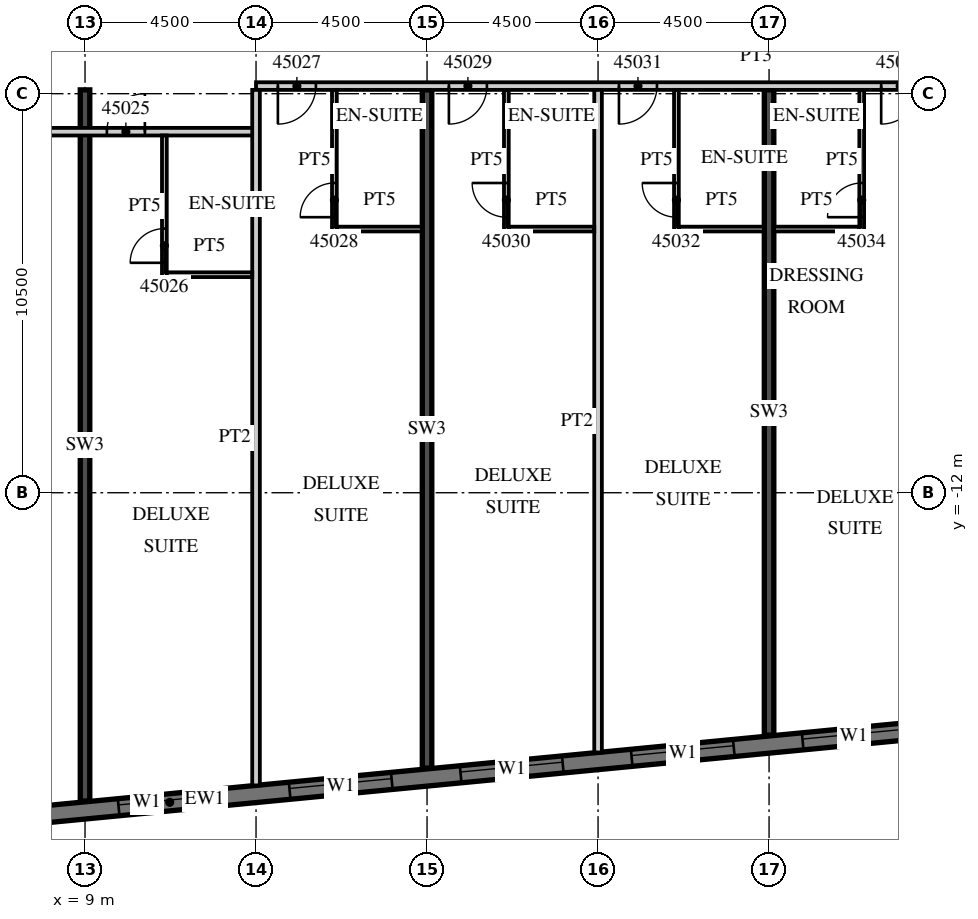
"""IFC4 building model, lengths in metres.
Left out: names, types, materials, properties, quantities, classifications, styles, units other than length and angle.
Written with IfcOpenShell. Run it as: python <this file> out.ifc"""

import sys

from ifc_helpers import new_model, si_unit, direction, frame, frame_2d, origin, place, context, subcontext, project, spatial, rectangle, extrude, element, fill, save


model = new_model("IFC4")
c1 = context("Model", 3, precision=1e-05, world=origin(), true_north=direction((0.0, 1.0)))
c2 = subcontext(c1, "Body", "Model", "MODEL_VIEW")
j1 = project(units=[si_unit("LENGTHUNIT", "METRE"), si_unit("PLANEANGLEUNIT", "RADIAN")], contexts=[c1])
p1 = place(None, origin())
s1 = spatial("IfcSite", under=j1, at=p1, CompositionType="ELEMENT")
p2 = place(p1, origin())
s2 = spatial("IfcBuilding", under=s1, at=p2, CompositionType="ELEMENT")
p3 = place(p2, frame((0.0, 0.0, 190.0)))
s3 = spatial("IfcBuildingStorey", under=s2, at=p3, CompositionType="ELEMENT", Elevation=190.0)
p4 = place(p3, frame((9.0, -20.112, 0.0), z_axis=(0.0, 0.0, 1.0), x_axis=(0.0, 1.0, 0.0)))
e1 = element("IfcWall", 1, at=p4, inside=s3, PredefinedType="SHEAR", context=c2, shape_type="SweptSolid", body=[
    extrude(rectangle(XDim=18.712, YDim=0.25, at=frame_2d((9.356, 0.0))), origin(), (0.0, 0.0, 1.0), 3.3),
])
p5 = place(p3, frame((18.0, -19.245, 0.0), z_axis=(0.0, 0.0, 1.0), x_axis=(0.0, 1.0, 0.0)))
e2 = element("IfcWall", 2, at=p5, inside=s3, PredefinedType="SHEAR", context=c2, shape_type="SweptSolid", body=[
    extrude(rectangle(XDim=17.845, YDim=0.25, at=frame_2d((8.923, 0.0))), origin(), (0.0, 0.0, 1.0), 3.3),
])
p6 = place(p3, frame((27.0, -18.379, 0.0), z_axis=(0.0, 0.0, 1.0), x_axis=(0.0, 1.0, 0.0)))
e3 = element("IfcWall", 3, at=p6, inside=s3, PredefinedType="SHEAR", context=c2, shape_type="SweptSolid", body=[
    extrude(rectangle(XDim=16.979, YDim=0.25, at=frame_2d((8.489, 0.0))), origin(), (0.0, 0.0, 1.0), 3.3),
])
p7 = place(p3, frame((-13.521, -22.529, 0.0), z_axis=(0.0, 0.0, 1.0), x_axis=(0.995396436651, 0.095843277819, 0.0)))
e4 = element("IfcWall", 4, at=p7, inside=s3, PredefinedType="SOLIDWALL", context=c2, shape_type="SweptSolid", body=[
    extrude(rectangle(XDim=51.578, YDim=0.45, at=frame_2d((25.789, 0.0))), origin(), (0.0, 0.0, 1.0), 3.02),
])
p8 = place(p7, frame((0.91, 0.0, 0.45)))
e5 = element("IfcOpeningElement", 5, at=p8, cuts=e4, PredefinedType="OPENING", context=c2, shape_type="SweptSolid", body=[
    extrude(rectangle(XDim=2.7, YDim=2.25, at=frame_2d((1.35, 1.125))), frame((0.0, 0.235, 0.0), z_axis=(0.0, -1.0, 0.0), x_axis=(1.0, 0.0, 0.0)), (0.0, 0.0, 1.0), 0.47),
])
p9 = place(p7, frame((5.431, 0.0, 0.45)))
e6 = element("IfcOpeningElement", 6, at=p9, cuts=e4, PredefinedType="OPENING", context=c2, shape_type="SweptSolid", body=[
    extrude(rectangle(XDim=2.7, YDim=2.25, at=frame_2d((1.35, 1.125))), frame((0.0, 0.235, 0.0), z_axis=(0.0, -1.0, 0.0), x_axis=(1.0, 0.0, 0.0)), (0.0, 0.0, 1.0), 0.47),
])
p10 = place(p7, frame((9.952, 0.0, 0.45)))
e7 = element("IfcOpeningElement", 7, at=p10, cuts=e4, PredefinedType="OPENING", context=c2, shape_type="SweptSolid", body=[
    extrude(rectangle(XDim=2.7, YDim=2.25, at=frame_2d((1.35, 1.125))), frame((0.0, 0.235, 0.0), z_axis=(0.0, -1.0, 0.0), x_axis=(1.0, 0.0, 0.0)), (0.0, 0.0, 1.0), 0.47),
])
p11 = place(p7, frame((14.473, 0.0, 0.45)))
e8 = element("IfcOpeningElement", 8, at=p11, cuts=e4, PredefinedType="OPENING", context=c2, shape_type="SweptSolid", body=[
    extrude(rectangle(XDim=2.7, YDim=2.25, at=frame_2d((1.35, 1.125))), frame((0.0, 0.235, 0.0), z_axis=(0.0, -1.0, 0.0), x_axis=(1.0, 0.0, 0.0)), (0.0, 0.0, 1.0), 0.47),
])
p12 = place(p7, frame((18.994, 0.0, 0.45)))
e9 = element("IfcOpeningElement", 9, at=p12, cuts=e4, PredefinedType="OPENING", context=c2, shape_type="SweptSolid", body=[
    extrude(rectangle(XDim=2.7, YDim=2.25, at=frame_2d((1.35, 1.125))), frame((0.0, 0.235, 0.0), z_axis=(0.0, -1.0, 0.0), x_axis=(1.0, 0.0, 0.0)), (0.0, 0.0, 1.0), 0.47),
])
p13 = place(p7, frame((23.514, 0.0, 0.45)))
e10 = element("IfcOpeningElement", 10, at=p13, cuts=e4, PredefinedType="OPENING", context=c2, shape_type="SweptSolid", body=[
    extrude(rectangle(XDim=2.7, YDim=2.25, at=frame_2d((1.35, 1.125))), frame((0.0, 0.235, 0.0), z_axis=(0.0, -1.0, 0.0), x_axis=(1.0, 0.0, 0.0)), (0.0, 0.0, 1.0), 0.47),
])
p14 = place(p7, frame((28.035, 0.0, 0.45)))
e11 = element("IfcOpeningElement", 11, at=p14, cuts=e4, PredefinedType="OPENING", context=c2, shape_type="SweptSolid", body=[
    extrude(rectangle(XDim=2.7, YDim=2.25, at=frame_2d((1.35, 1.125))), frame((0.0, 0.235, 0.0), z_axis=(0.0, -1.0, 0.0), x_axis=(1.0, 0.0, 0.0)), (0.0, 0.0, 1.0), 0.47),
])
p15 = place(p7, frame((32.556, 0.0, 0.45)))
e12 = element("IfcOpeningElement", 12, at=p15, cuts=e4, PredefinedType="OPENING", context=c2, shape_type="SweptSolid", body=[
    extrude(rectangle(XDim=2.7, YDim=2.25, at=frame_2d((1.35, 1.125))), frame((0.0, 0.235, 0.0), z_axis=(0.0, -1.0, 0.0), x_axis=(1.0, 0.0, 0.0)), (0.0, 0.0, 1.0), 0.47),
])
p16 = place(p7, frame((37.077, 0.0, 0.45)))
e13 = element("IfcOpeningElement", 13, at=p16, cuts=e4, PredefinedType="OPENING", context=c2, shape_type="SweptSolid", body=[
    extrude(rectangle(XDim=2.7, YDim=2.25, at=frame_2d((1.35, 1.125))), frame((0.0, 0.235, 0.0), z_axis=(0.0, -1.0, 0.0), x_axis=(1.0, 0.0, 0.0)), (0.0, 0.0, 1.0), 0.47),
])
p17 = place(p7, frame((41.598, 0.0, 0.45)))
e14 = element("IfcOpeningElement", 14, at=p17, cuts=e4, PredefinedType="OPENING", context=c2, shape_type="SweptSolid", body=[
    extrude(rectangle(XDim=2.7, YDim=2.25, at=frame_2d((1.35, 1.125))), frame((0.0, 0.235, 0.0), z_axis=(0.0, -1.0, 0.0), x_axis=(1.0, 0.0, 0.0)), (0.0, 0.0, 1.0), 0.47),
])
p18 = place(p7, frame((46.119, 0.0, 0.45)))
e15 = element("IfcOpeningElement", 15, at=p18, cuts=e4, PredefinedType="OPENING", context=c2, shape_type="SweptSolid", body=[
    extrude(rectangle(XDim=2.7, YDim=2.25, at=frame_2d((1.35, 1.125))), frame((0.0, 0.235, 0.0), z_axis=(0.0, -1.0, 0.0), x_axis=(1.0, 0.0, 0.0)), (0.0, 0.0, 1.0), 0.47),
])
p19 = place(p3, frame((-13.5, -2.5, 0.0), z_axis=(0.0, 0.0, 1.0), x_axis=(1.0, 0.0, 0.0)))
e16 = element("IfcWall", 16, at=p19, inside=s3, PredefinedType="PARTITIONING", context=c2, shape_type="SweptSolid", body=[
    extrude(rectangle(XDim=27.0, YDim=0.2, at=frame_2d((13.5, 0.0))), origin(), (0.0, 0.0, 1.0), 3.02),
])
p20 = place(p19, frame((0.575, 0.0, 0.0)))
e17 = element("IfcOpeningElement", 17, at=p20, cuts=e16, PredefinedType="OPENING", context=c2, shape_type="SweptSolid", body=[
    extrude(rectangle(XDim=1.0, YDim=2.1, at=frame_2d((0.5, 1.05))), frame((0.0, 0.11, 0.0), z_axis=(0.0, -1.0, 0.0), x_axis=(1.0, 0.0, 0.0)), (0.0, 0.0, 1.0), 0.22),
])
p21 = place(p19, frame((7.45, 0.0, 0.0)))
e18 = element("IfcOpeningElement", 18, at=p21, cuts=e16, PredefinedType="OPENING", context=c2, shape_type="SweptSolid", body=[
    extrude(rectangle(XDim=1.0, YDim=2.1, at=frame_2d((0.5, 1.05))), frame((0.0, 0.11, 0.0), z_axis=(0.0, -1.0, 0.0), x_axis=(1.0, 0.0, 0.0)), (0.0, 0.0, 1.0), 0.22),
])
p22 = place(p19, frame((9.55, 0.0, 0.0)))
e19 = element("IfcOpeningElement", 19, at=p22, cuts=e16, PredefinedType="OPENING", context=c2, shape_type="SweptSolid", body=[
    extrude(rectangle(XDim=1.0, YDim=2.1, at=frame_2d((0.5, 1.05))), frame((0.0, 0.11, 0.0), z_axis=(0.0, -1.0, 0.0), x_axis=(1.0, 0.0, 0.0)), (0.0, 0.0, 1.0), 0.22),
])
p23 = place(p19, frame((18.862, 0.0, 0.0)))
e20 = element("IfcOpeningElement", 20, at=p23, cuts=e16, PredefinedType="OPENING", context=c2, shape_type="SweptSolid", body=[
    extrude(rectangle(XDim=1.2, YDim=2.1, at=frame_2d((0.6, 1.05))), frame((0.0, 0.11, 0.0), z_axis=(0.0, -1.0, 0.0), x_axis=(1.0, 0.0, 0.0)), (0.0, 0.0, 1.0), 0.22),
])
p24 = place(p19, frame((23.075, 0.0, 0.0)))
e21 = element("IfcOpeningElement", 21, at=p24, cuts=e16, PredefinedType="OPENING", context=c2, shape_type="SweptSolid", body=[
    extrude(rectangle(XDim=1.0, YDim=2.1, at=frame_2d((0.5, 1.05))), frame((0.0, 0.11, 0.0), z_axis=(0.0, -1.0, 0.0), x_axis=(1.0, 0.0, 0.0)), (0.0, 0.0, 1.0), 0.22),
])
p25 = place(p3, frame((13.5, -1.3, 0.0), z_axis=(0.0, 0.0, 1.0), x_axis=(1.0, 0.0, 0.0)))
e22 = element("IfcWall", 22, at=p25, inside=s3, PredefinedType="PARTITIONING", context=c2, shape_type="SweptSolid", body=[
    extrude(rectangle(XDim=26.317, YDim=0.2, at=frame_2d((13.158, 0.0))), origin(), (0.0, 0.0, 1.0), 3.02),
])
p26 = place(p25, frame((0.575, 0.0, 0.0)))
e23 = element("IfcOpeningElement", 23, at=p26, cuts=e22, PredefinedType="OPENING", context=c2, shape_type="SweptSolid", body=[
    extrude(rectangle(XDim=1.0, YDim=2.1, at=frame_2d((0.5, 1.05))), frame((0.0, 0.11, 0.0), z_axis=(0.0, -1.0, 0.0), x_axis=(1.0, 0.0, 0.0)), (0.0, 0.0, 1.0), 0.22),
])
p27 = place(p25, frame((5.075, 0.0, 0.0)))
e24 = element("IfcOpeningElement", 24, at=p27, cuts=e22, PredefinedType="OPENING", context=c2, shape_type="SweptSolid", body=[
    extrude(rectangle(XDim=1.0, YDim=2.1, at=frame_2d((0.5, 1.05))), frame((0.0, 0.11, 0.0), z_axis=(0.0, -1.0, 0.0), x_axis=(1.0, 0.0, 0.0)), (0.0, 0.0, 1.0), 0.22),
])
p28 = place(p25, frame((9.55, 0.0, 0.0)))
e25 = element("IfcOpeningElement", 25, at=p28, cuts=e22, PredefinedType="OPENING", context=c2, shape_type="SweptSolid", body=[
    extrude(rectangle(XDim=1.0, YDim=2.1, at=frame_2d((0.5, 1.05))), frame((0.0, 0.11, 0.0), z_axis=(0.0, -1.0, 0.0), x_axis=(1.0, 0.0, 0.0)), (0.0, 0.0, 1.0), 0.22),
])
p29 = place(p25, frame((16.45, 0.0, 0.0)))
e26 = element("IfcOpeningElement", 26, at=p29, cuts=e22, PredefinedType="OPENING", context=c2, shape_type="SweptSolid", body=[
    extrude(rectangle(XDim=1.0, YDim=2.1, at=frame_2d((0.5, 1.05))), frame((0.0, 0.11, 0.0), z_axis=(0.0, -1.0, 0.0), x_axis=(1.0, 0.0, 0.0)), (0.0, 0.0, 1.0), 0.22),
])
p30 = place(p25, frame((18.55, 0.0, 0.0)))
e27 = element("IfcOpeningElement", 27, at=p30, cuts=e22, PredefinedType="OPENING", context=c2, shape_type="SweptSolid", body=[
    extrude(rectangle(XDim=1.0, YDim=2.1, at=frame_2d((0.5, 1.05))), frame((0.0, 0.11, 0.0), z_axis=(0.0, -1.0, 0.0), x_axis=(1.0, 0.0, 0.0)), (0.0, 0.0, 1.0), 0.22),
])
p31 = place(p25, frame((25.208, 0.0, 0.0)))
e28 = element("IfcOpeningElement", 28, at=p31, cuts=e22, PredefinedType="OPENING", context=c2, shape_type="SweptSolid", body=[
    extrude(rectangle(XDim=0.9, YDim=2.1, at=frame_2d((0.45, 1.05))), frame((0.0, 0.11, 0.0), z_axis=(0.0, -1.0, 0.0), x_axis=(1.0, 0.0, 0.0)), (0.0, 0.0, 1.0), 0.22),
])
p32 = place(p3, frame((13.5, -19.701, 0.0), z_axis=(0.0, 0.0, 1.0), x_axis=(0.0, 1.0, 0.0)))
e29 = element("IfcWall", 29, at=p32, inside=s3, PredefinedType="PARTITIONING", context=c2, shape_type="SweptSolid", body=[
    extrude(rectangle(XDim=18.301, YDim=0.2, at=frame_2d((9.15, 0.0))), origin(), (0.0, 0.0, 1.0), 3.02),
])
p33 = place(p3, frame((11.088, -6.325, 0.0), z_axis=(0.0, 0.0, 1.0), x_axis=(0.0, 1.0, 0.0)))
e30 = element("IfcWall", 30, at=p33, inside=s3, PredefinedType="PARTITIONING", context=c2, shape_type="SweptSolid", body=[
    extrude(rectangle(XDim=3.725, YDim=0.125, at=frame_2d((1.862, 0.0))), origin(), (0.0, 0.0, 1.0), 3.02),
])
p34 = place(p33, frame((0.375, 0.0, 0.0)))
e31 = element("IfcOpeningElement", 31, at=p34, cuts=e30, PredefinedType="OPENING", context=c2, shape_type="SweptSolid", body=[
    extrude(rectangle(XDim=0.9, YDim=2.1, at=frame_2d((0.45, 1.05))), frame((0.0, 0.073, 0.0), z_axis=(0.0, -1.0, 0.0), x_axis=(1.0, 0.0, 0.0)), (0.0, 0.0, 1.0), 0.145),
])
p35 = place(p3, frame((11.15, -6.263, 0.0), z_axis=(0.0, 0.0, 1.0), x_axis=(1.0, 0.0, 0.0)))
e32 = element("IfcWall", 32, at=p35, inside=s3, PredefinedType="PARTITIONING", context=c2, shape_type="SweptSolid", body=[
    extrude(rectangle(XDim=2.25, YDim=0.125, at=frame_2d((1.125, 0.0))), origin(), (0.0, 0.0, 1.0), 3.02),
])
p36 = place(p3, frame((15.562, -5.125, 0.0), z_axis=(0.0, 0.0, 1.0), x_axis=(0.0, 1.0, 0.0)))
e33 = element("IfcWall", 33, at=p36, inside=s3, PredefinedType="PARTITIONING", context=c2, shape_type="SweptSolid", body=[
    extrude(rectangle(XDim=3.725, YDim=0.125, at=frame_2d((1.863, 0.0))), origin(), (0.0, 0.0, 1.0), 3.02),
])
p37 = place(p36, frame((0.375, 0.0, 0.0)))
e34 = element("IfcOpeningElement", 34, at=p37, cuts=e33, PredefinedType="OPENING", context=c2, shape_type="SweptSolid", body=[
    extrude(rectangle(XDim=0.9, YDim=2.1, at=frame_2d((0.45, 1.05))), frame((0.0, 0.073, 0.0), z_axis=(0.0, -1.0, 0.0), x_axis=(1.0, 0.0, 0.0)), (0.0, 0.0, 1.0), 0.145),
])
p38 = place(p3, frame((15.625, -5.062, 0.0), z_axis=(0.0, 0.0, 1.0), x_axis=(1.0, 0.0, 0.0)))
e35 = element("IfcWall", 35, at=p38, inside=s3, PredefinedType="PARTITIONING", context=c2, shape_type="SweptSolid", body=[
    extrude(rectangle(XDim=2.25, YDim=0.125, at=frame_2d((1.125, 0.0))), origin(), (0.0, 0.0, 1.0), 3.02),
])
p39 = place(p3, frame((22.5, -18.834, 0.0), z_axis=(0.0, 0.0, 1.0), x_axis=(0.0, 1.0, 0.0)))
e36 = element("IfcWall", 36, at=p39, inside=s3, PredefinedType="PARTITIONING", context=c2, shape_type="SweptSolid", body=[
    extrude(rectangle(XDim=17.434, YDim=0.2, at=frame_2d((8.717, 0.0))), origin(), (0.0, 0.0, 1.0), 3.02),
])
p40 = place(p3, frame((20.087, -5.125, 0.0), z_axis=(0.0, 0.0, 1.0), x_axis=(0.0, 1.0, 0.0)))
e37 = element("IfcWall", 37, at=p40, inside=s3, PredefinedType="PARTITIONING", context=c2, shape_type="SweptSolid", body=[
    extrude(rectangle(XDim=3.725, YDim=0.125, at=frame_2d((1.863, 0.0))), origin(), (0.0, 0.0, 1.0), 3.02),
])
p41 = place(p40, frame((0.375, 0.0, 0.0)))
e38 = element("IfcOpeningElement", 38, at=p41, cuts=e37, PredefinedType="OPENING", context=c2, shape_type="SweptSolid", body=[
    extrude(rectangle(XDim=0.9, YDim=2.1, at=frame_2d((0.45, 1.05))), frame((0.0, 0.073, 0.0), z_axis=(0.0, -1.0, 0.0), x_axis=(1.0, 0.0, 0.0)), (0.0, 0.0, 1.0), 0.145),
])
p42 = place(p3, frame((20.15, -5.062, 0.0), z_axis=(0.0, 0.0, 1.0), x_axis=(1.0, 0.0, 0.0)))
e39 = element("IfcWall", 39, at=p42, inside=s3, PredefinedType="PARTITIONING", context=c2, shape_type="SweptSolid", body=[
    extrude(rectangle(XDim=2.25, YDim=0.125, at=frame_2d((1.125, 0.0))), origin(), (0.0, 0.0, 1.0), 3.02),
])
p43 = place(p3, frame((24.562, -5.125, 0.0), z_axis=(0.0, 0.0, 1.0), x_axis=(0.0, 1.0, 0.0)))
e40 = element("IfcWall", 40, at=p43, inside=s3, PredefinedType="PARTITIONING", context=c2, shape_type="SweptSolid", body=[
    extrude(rectangle(XDim=3.725, YDim=0.125, at=frame_2d((1.863, 0.0))), origin(), (0.0, 0.0, 1.0), 3.02),
])
p44 = place(p43, frame((0.375, 0.0, 0.0)))
e41 = element("IfcOpeningElement", 41, at=p44, cuts=e40, PredefinedType="OPENING", context=c2, shape_type="SweptSolid", body=[
    extrude(rectangle(XDim=0.9, YDim=2.1, at=frame_2d((0.45, 1.05))), frame((0.0, 0.073, 0.0), z_axis=(0.0, -1.0, 0.0), x_axis=(1.0, 0.0, 0.0)), (0.0, 0.0, 1.0), 0.145),
])
p45 = place(p3, frame((24.625, -5.062, 0.0), z_axis=(0.0, 0.0, 1.0), x_axis=(1.0, 0.0, 0.0)))
e42 = element("IfcWall", 42, at=p45, inside=s3, PredefinedType="PARTITIONING", context=c2, shape_type="SweptSolid", body=[
    extrude(rectangle(XDim=2.25, YDim=0.125, at=frame_2d((1.125, 0.0))), origin(), (0.0, 0.0, 1.0), 3.02),
])
p46 = place(p3, frame((29.438, -5.125, 0.0), z_axis=(0.0, 0.0, 1.0), x_axis=(0.0, 1.0, 0.0)))
e43 = element("IfcWall", 43, at=p46, inside=s3, PredefinedType="PARTITIONING", context=c2, shape_type="SweptSolid", body=[
    extrude(rectangle(XDim=3.725, YDim=0.125, at=frame_2d((1.863, 0.0))), origin(), (0.0, 0.0, 1.0), 3.02),
])
p47 = place(p46, frame((0.375, 0.0, 0.0)))
e44 = element("IfcOpeningElement", 44, at=p47, cuts=e43, PredefinedType="OPENING", context=c2, shape_type="SweptSolid", body=[
    extrude(rectangle(XDim=0.9, YDim=2.1, at=frame_2d((0.45, 1.05))), frame((0.0, 0.073, 0.0), z_axis=(0.0, -1.0, 0.0), x_axis=(1.0, 0.0, 0.0)), (0.0, 0.0, 1.0), 0.145),
])
p48 = place(p3, frame((27.125, -5.062, 0.0), z_axis=(0.0, 0.0, 1.0), x_axis=(1.0, 0.0, 0.0)))
e45 = element("IfcWall", 45, at=p48, inside=s3, PredefinedType="PARTITIONING", context=c2, shape_type="SweptSolid", body=[
    extrude(rectangle(XDim=2.25, YDim=0.125, at=frame_2d((1.125, 0.0))), origin(), (0.0, 0.0, 1.0), 3.02),
])
p49 = place(p13, origin())
e46 = element("IfcWindow", 46, at=p49, inside=s3, PartitioningType="SINGLE_PANEL", PredefinedType="WINDOW", context=c2, shape_type="SweptSolid", body=[
    extrude(rectangle(XDim=2.7, YDim=2.25, at=frame_2d((1.35, 1.125))), frame((0.0, 0.09, 0.0), z_axis=(0.0, -1.0, 0.0), x_axis=(1.0, 0.0, 0.0)), (0.0, 0.0, 1.0), 0.06),
])
fill(e10, e46)
p50 = place(p14, origin())
e47 = element("IfcWindow", 47, at=p50, inside=s3, PartitioningType="SINGLE_PANEL", PredefinedType="WINDOW", context=c2, shape_type="SweptSolid", body=[
    extrude(rectangle(XDim=2.7, YDim=2.25, at=frame_2d((1.35, 1.125))), frame((0.0, 0.09, 0.0), z_axis=(0.0, -1.0, 0.0), x_axis=(1.0, 0.0, 0.0)), (0.0, 0.0, 1.0), 0.06),
])
fill(e11, e47)
p51 = place(p15, origin())
e48 = element("IfcWindow", 48, at=p51, inside=s3, PartitioningType="SINGLE_PANEL", PredefinedType="WINDOW", context=c2, shape_type="SweptSolid", body=[
    extrude(rectangle(XDim=2.7, YDim=2.25, at=frame_2d((1.35, 1.125))), frame((0.0, 0.09, 0.0), z_axis=(0.0, -1.0, 0.0), x_axis=(1.0, 0.0, 0.0)), (0.0, 0.0, 1.0), 0.06),
])
fill(e12, e48)
p52 = place(p16, origin())
e49 = element("IfcWindow", 49, at=p52, inside=s3, PartitioningType="SINGLE_PANEL", PredefinedType="WINDOW", context=c2, shape_type="SweptSolid", body=[
    extrude(rectangle(XDim=2.7, YDim=2.25, at=frame_2d((1.35, 1.125))), frame((0.0, 0.09, 0.0), z_axis=(0.0, -1.0, 0.0), x_axis=(1.0, 0.0, 0.0)), (0.0, 0.0, 1.0), 0.06),
])
fill(e13, e49)
p53 = place(p17, origin())
e50 = element("IfcWindow", 50, at=p53, inside=s3, PartitioningType="SINGLE_PANEL", PredefinedType="WINDOW", context=c2, shape_type="SweptSolid", body=[
    extrude(rectangle(XDim=2.7, YDim=2.25, at=frame_2d((1.35, 1.125))), frame((0.0, 0.09, 0.0), z_axis=(0.0, -1.0, 0.0), x_axis=(1.0, 0.0, 0.0)), (0.0, 0.0, 1.0), 0.06),
])
fill(e14, e50)
p54 = place(p24, origin())
e51 = element("IfcDoor", 51, at=p54, inside=s3, OperationType="SINGLE_SWING_RIGHT", PredefinedType="DOOR", context=c2, shape_type="SweptSolid", body=[
    extrude(rectangle(XDim=1.0, YDim=2.1, at=frame_2d((0.5, 1.05))), frame((0.0, 0.025, 0.0), z_axis=(0.0, -1.0, 0.0), x_axis=(1.0, 0.0, 0.0)), (0.0, 0.0, 1.0), 0.05),
])
fill(e21, e51)
p55 = place(p34, origin())
e52 = element("IfcDoor", 52, at=p55, inside=s3, OperationType="SINGLE_SWING_LEFT", PredefinedType="DOOR", context=c2, shape_type="SweptSolid", body=[
    extrude(rectangle(XDim=0.9, YDim=2.1, at=frame_2d((0.45, 1.05))), frame((0.0, 0.025, 0.0), z_axis=(0.0, -1.0, 0.0), x_axis=(1.0, 0.0, 0.0)), (0.0, 0.0, 1.0), 0.05),
])
fill(e31, e52)
p56 = place(p26, origin())
e53 = element("IfcDoor", 53, at=p56, inside=s3, OperationType="SINGLE_SWING_LEFT", PredefinedType="DOOR", context=c2, shape_type="SweptSolid", body=[
    extrude(rectangle(XDim=1.0, YDim=2.1, at=frame_2d((0.5, 1.05))), frame((0.0, 0.025, 0.0), z_axis=(0.0, -1.0, 0.0), x_axis=(1.0, 0.0, 0.0)), (0.0, 0.0, 1.0), 0.05),
])
fill(e23, e53)
p57 = place(p37, origin())
e54 = element("IfcDoor", 54, at=p57, inside=s3, OperationType="SINGLE_SWING_LEFT", PredefinedType="DOOR", context=c2, shape_type="SweptSolid", body=[
    extrude(rectangle(XDim=0.9, YDim=2.1, at=frame_2d((0.45, 1.05))), frame((0.0, 0.025, 0.0), z_axis=(0.0, -1.0, 0.0), x_axis=(1.0, 0.0, 0.0)), (0.0, 0.0, 1.0), 0.05),
])
fill(e34, e54)
p58 = place(p27, origin())
e55 = element("IfcDoor", 55, at=p58, inside=s3, OperationType="SINGLE_SWING_LEFT", PredefinedType="DOOR", context=c2, shape_type="SweptSolid", body=[
    extrude(rectangle(XDim=1.0, YDim=2.1, at=frame_2d((0.5, 1.05))), frame((0.0, 0.025, 0.0), z_axis=(0.0, -1.0, 0.0), x_axis=(1.0, 0.0, 0.0)), (0.0, 0.0, 1.0), 0.05),
])
fill(e24, e55)
p59 = place(p41, origin())
e56 = element("IfcDoor", 56, at=p59, inside=s3, OperationType="SINGLE_SWING_RIGHT", PredefinedType="DOOR", context=c2, shape_type="SweptSolid", body=[
    extrude(rectangle(XDim=0.9, YDim=2.1, at=frame_2d((0.45, 1.05))), frame((0.0, 0.025, 0.0), z_axis=(0.0, -1.0, 0.0), x_axis=(1.0, 0.0, 0.0)), (0.0, 0.0, 1.0), 0.05),
])
fill(e38, e56)
p60 = place(p28, origin())
e57 = element("IfcDoor", 57, at=p60, inside=s3, OperationType="SINGLE_SWING_LEFT", PredefinedType="DOOR", context=c2, shape_type="SweptSolid", body=[
    extrude(rectangle(XDim=1.0, YDim=2.1, at=frame_2d((0.5, 1.05))), frame((0.0, 0.025, 0.0), z_axis=(0.0, -1.0, 0.0), x_axis=(1.0, 0.0, 0.0)), (0.0, 0.0, 1.0), 0.05),
])
fill(e25, e57)
p61 = place(p44, origin())
e58 = element("IfcDoor", 58, at=p61, inside=s3, OperationType="SINGLE_SWING_RIGHT", PredefinedType="DOOR", context=c2, shape_type="SweptSolid", body=[
    extrude(rectangle(XDim=0.9, YDim=2.1, at=frame_2d((0.45, 1.05))), frame((0.0, 0.025, 0.0), z_axis=(0.0, -1.0, 0.0), x_axis=(1.0, 0.0, 0.0)), (0.0, 0.0, 1.0), 0.05),
])
fill(e41, e58)
p62 = place(p29, origin())
e59 = element("IfcDoor", 59, at=p62, inside=s3, OperationType="SINGLE_SWING_LEFT", PredefinedType="DOOR", context=c2, shape_type="SweptSolid", body=[
    extrude(rectangle(XDim=1.0, YDim=2.1, at=frame_2d((0.5, 1.05))), frame((0.0, 0.025, 0.0), z_axis=(0.0, -1.0, 0.0), x_axis=(1.0, 0.0, 0.0)), (0.0, 0.0, 1.0), 0.05),
])
fill(e26, e59)
p63 = place(p47, origin())
e60 = element("IfcDoor", 60, at=p63, inside=s3, OperationType="SINGLE_SWING_LEFT", PredefinedType="DOOR", context=c2, shape_type="SweptSolid", body=[
    extrude(rectangle(XDim=0.9, YDim=2.1, at=frame_2d((0.45, 1.05))), frame((0.0, 0.025, 0.0), z_axis=(0.0, -1.0, 0.0), x_axis=(1.0, 0.0, 0.0)), (0.0, 0.0, 1.0), 0.05),
])
fill(e44, e60)
save(model, sys.argv[1])
